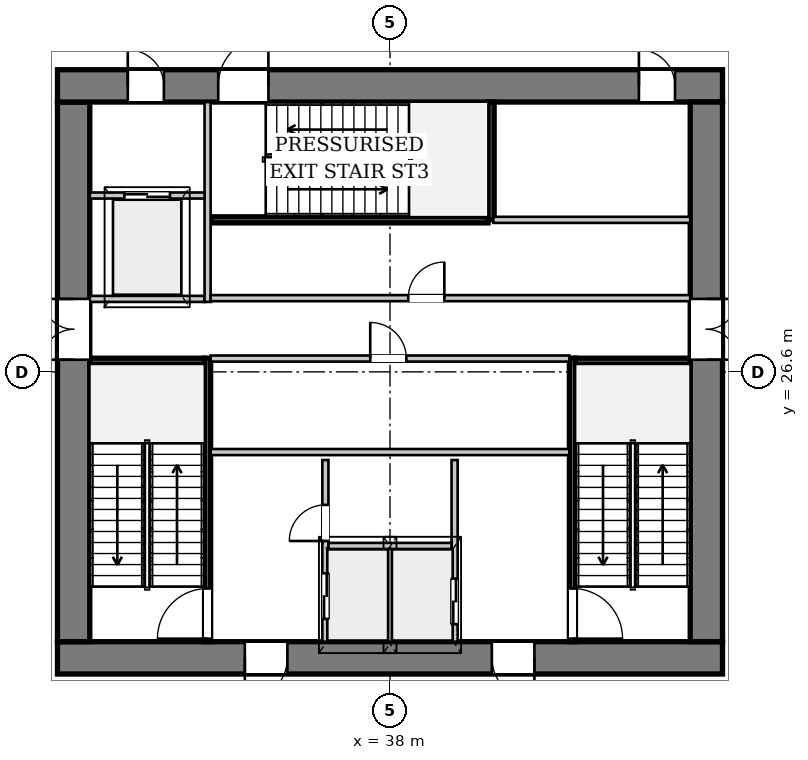
"""IFC4 building model, lengths in metres.
Left out: names, types, materials, properties, quantities, classifications, styles, units other than length and angle.
Written with IfcOpenShell. Run it as: python <this file> out.ifc"""

import sys

from ifc_helpers import new_model, si_unit, direction, frame, frame_2d, origin, place, context, subcontext, project, spatial, rectangle, extrude, source, transform, mapped, element, fill, save


model = new_model("IFC4")
c1 = context("Model", 3, precision=1e-05, world=origin(), true_north=direction((0.0, 1.0)))
c2 = subcontext(c1, "Body", "Model", "MODEL_VIEW")
j1 = project(units=[si_unit("LENGTHUNIT", "METRE"), si_unit("PLANEANGLEUNIT", "RADIAN")], contexts=[c1])
p1 = place(None, origin())
s1 = spatial("IfcSite", under=j1, at=p1, CompositionType="ELEMENT")
p2 = place(p1, origin())
s2 = spatial("IfcBuilding", under=s1, at=p2, CompositionType="ELEMENT")
p3 = place(p2, frame((0.0, 0.0, -9.6)))
s3 = spatial("IfcBuildingStorey", under=s2, at=p3, CompositionType="ELEMENT", Elevation=-9.6)
p4 = place(p3, frame((46.75, 19.075, 0.0), z_axis=(0.0, 0.0, 1.0), x_axis=(-1.0, 0.0, 0.0)))
e1 = element("IfcWall", 1, at=p4, inside=s3, PredefinedType="SHEAR", context=c2, shape_type="SweptSolid", body=[
    extrude(rectangle(XDim=17.5, YDim=0.85, at=frame_2d((8.75, 0.0))), origin(), (0.0, 0.0, 1.0), 4.45),
])
p5 = place(p4, frame((4.95, 0.0, 0.0)))
e2 = element("IfcOpeningElement", 2, at=p5, cuts=e1, PredefinedType="OPENING", context=c2, shape_type="SweptSolid", body=[
    extrude(rectangle(XDim=1.12, YDim=2.25, at=frame_2d((0.56, 1.125))), frame((0.0, 0.435, 0.0), z_axis=(0.0, -1.0, 0.0), x_axis=(1.0, 0.0, 0.0)), (0.0, 0.0, 1.0), 0.87),
])
p6 = place(p4, frame((11.45, 0.0, 0.0)))
e3 = element("IfcOpeningElement", 3, at=p6, cuts=e1, PredefinedType="OPENING", context=c2, shape_type="SweptSolid", body=[
    extrude(rectangle(XDim=1.12, YDim=2.25, at=frame_2d((0.56, 1.125))), frame((0.0, 0.435, 0.0), z_axis=(0.0, -1.0, 0.0), x_axis=(1.0, 0.0, 0.0)), (0.0, 0.0, 1.0), 0.87),
])
p7 = place(p3, frame((29.675, 19.5, 0.0), z_axis=(0.0, 0.0, 1.0), x_axis=(0.0, 1.0, 0.0)))
e4 = element("IfcWall", 4, at=p7, inside=s3, PredefinedType="SHEAR", context=c2, shape_type="SweptSolid", body=[
    extrude(rectangle(XDim=14.2, YDim=0.85, at=frame_2d((7.1, 0.0))), origin(), (0.0, 0.0, 1.0), 4.45),
])
p8 = place(p7, frame((7.42, 0.0, 0.0)))
e5 = element("IfcOpeningElement", 5, at=p8, cuts=e4, PredefinedType="OPENING", context=c2, shape_type="SweptSolid", body=[
    extrude(rectangle(XDim=1.6, YDim=2.2, at=frame_2d((0.8, 1.1))), frame((0.0, 0.435, 0.0), z_axis=(0.0, -1.0, 0.0), x_axis=(1.0, 0.0, 0.0)), (0.0, 0.0, 1.0), 0.87),
])
p9 = place(p3, frame((29.25, 34.125, 0.0), z_axis=(0.0, 0.0, 1.0), x_axis=(1.0, 0.0, 0.0)))
e6 = element("IfcWall", 6, at=p9, inside=s3, PredefinedType="SHEAR", context=c2, shape_type="SweptSolid", body=[
    extrude(rectangle(XDim=17.5, YDim=0.85, at=frame_2d((8.75, 0.0))), origin(), (0.0, 0.0, 1.0), 4.45),
])
p10 = place(p9, frame((1.85, 0.0, 0.0)))
e7 = element("IfcOpeningElement", 7, at=p10, cuts=e6, PredefinedType="OPENING", context=c2, shape_type="SweptSolid", body=[
    extrude(rectangle(XDim=0.95, YDim=2.1, at=frame_2d((0.475, 1.05))), frame((0.0, 0.435, 0.0), z_axis=(0.0, -1.0, 0.0), x_axis=(1.0, 0.0, 0.0)), (0.0, 0.0, 1.0), 0.87),
])
p11 = place(p9, frame((4.23, 0.0, 0.0)))
e8 = element("IfcOpeningElement", 8, at=p11, cuts=e6, PredefinedType="OPENING", context=c2, shape_type="SweptSolid", body=[
    extrude(rectangle(XDim=1.32, YDim=2.2, at=frame_2d((0.66, 1.1))), frame((0.0, 0.435, 0.0), z_axis=(0.0, -1.0, 0.0), x_axis=(1.0, 0.0, 0.0)), (0.0, 0.0, 1.0), 0.87),
])
p12 = place(p9, frame((15.3, 0.0, 0.0)))
e9 = element("IfcOpeningElement", 9, at=p12, cuts=e6, PredefinedType="OPENING", context=c2, shape_type="SweptSolid", body=[
    extrude(rectangle(XDim=0.95, YDim=2.1, at=frame_2d((0.475, 1.05))), frame((0.0, 0.435, 0.0), z_axis=(0.0, -1.0, 0.0), x_axis=(1.0, 0.0, 0.0)), (0.0, 0.0, 1.0), 0.87),
])
p13 = place(p3, frame((46.325, 33.7, 0.0), z_axis=(0.0, 0.0, 1.0), x_axis=(0.0, -1.0, 0.0)))
e10 = element("IfcWall", 10, at=p13, inside=s3, PredefinedType="SHEAR", context=c2, shape_type="SweptSolid", body=[
    extrude(rectangle(XDim=14.2, YDim=0.85, at=frame_2d((7.1, 0.0))), origin(), (0.0, 0.0, 1.0), 4.45),
])
p14 = place(p13, frame((5.18, 0.0, 0.0)))
e11 = element("IfcOpeningElement", 11, at=p14, cuts=e10, PredefinedType="OPENING", context=c2, shape_type="SweptSolid", body=[
    extrude(rectangle(XDim=1.6, YDim=2.2, at=frame_2d((0.8, 1.1))), frame((0.0, 0.435, 0.0), z_axis=(0.0, -1.0, 0.0), x_axis=(1.0, 0.0, 0.0)), (0.0, 0.0, 1.0), 0.87),
])
p15 = place(p3, frame((33.2, 19.5, 0.0), z_axis=(0.0, 0.0, 1.0), x_axis=(0.0, 1.0, 0.0)))
e12 = element("IfcWall", 12, at=p15, inside=s3, PredefinedType="PARTITIONING", context=c2, shape_type="SweptSolid", body=[
    extrude(rectangle(XDim=7.46, YDim=0.16, at=frame_2d((3.73, 0.0))), origin(), (0.0, 0.0, 1.0), 4.45),
])
p16 = place(p15, frame((0.08, 0.0, 0.0)))
e13 = element("IfcOpeningElement", 13, at=p16, cuts=e12, PredefinedType="OPENING", context=c2, shape_type="SweptSolid", body=[
    extrude(rectangle(XDim=1.32, YDim=2.2, at=frame_2d((0.66, 1.1))), frame((0.0, 0.09, 0.0), z_axis=(0.0, -1.0, 0.0), x_axis=(1.0, 0.0, 0.0)), (0.0, 0.0, 1.0), 0.18),
])
p17 = place(p3, frame((30.1, 26.88, 0.0), z_axis=(0.0, 0.0, 1.0), x_axis=(1.0, 0.0, 0.0)))
e14 = element("IfcWall", 14, at=p17, inside=s3, PredefinedType="PARTITIONING", context=c2, shape_type="SweptSolid", body=[
    extrude(rectangle(XDim=3.02, YDim=0.16, at=frame_2d((1.51, 0.0))), origin(), (0.0, 0.0, 1.0), 4.45),
])
p18 = place(p3, frame((42.8, 26.96, 0.0), z_axis=(0.0, 0.0, 1.0), x_axis=(0.0, -1.0, 0.0)))
e15 = element("IfcWall", 15, at=p18, inside=s3, PredefinedType="PARTITIONING", context=c2, shape_type="SweptSolid", body=[
    extrude(rectangle(XDim=7.46, YDim=0.16, at=frame_2d((3.73, 0.0))), origin(), (0.0, 0.0, 1.0), 4.45),
])
p19 = place(p18, frame((6.06, 0.0, 0.0)))
e16 = element("IfcOpeningElement", 16, at=p19, cuts=e15, PredefinedType="OPENING", context=c2, shape_type="SweptSolid", body=[
    extrude(rectangle(XDim=1.32, YDim=2.2, at=frame_2d((0.66, 1.1))), frame((0.0, 0.09, 0.0), z_axis=(0.0, -1.0, 0.0), x_axis=(1.0, 0.0, 0.0)), (0.0, 0.0, 1.0), 0.18),
])
p20 = place(p3, frame((42.88, 26.88, 0.0), z_axis=(0.0, 0.0, 1.0), x_axis=(1.0, 0.0, 0.0)))
e17 = element("IfcWall", 17, at=p20, inside=s3, PredefinedType="PARTITIONING", context=c2, shape_type="SweptSolid", body=[
    extrude(rectangle(XDim=3.02, YDim=0.16, at=frame_2d((1.51, 0.0))), origin(), (0.0, 0.0, 1.0), 4.45),
])
p21 = place(p3, frame((33.28, 30.6, 0.0), z_axis=(0.0, 0.0, 1.0), x_axis=(1.0, 0.0, 0.0)))
e18 = element("IfcWall", 18, at=p21, inside=s3, PredefinedType="PARTITIONING", context=c2, shape_type="SweptSolid", body=[
    extrude(rectangle(XDim=7.3, YDim=0.16, at=frame_2d((3.65, 0.0))), origin(), (0.0, 0.0, 1.0), 4.45),
])
p22 = place(p3, frame((40.66, 30.6, 0.0), z_axis=(0.0, 0.0, 1.0), x_axis=(0.0, 1.0, 0.0)))
e19 = element("IfcWall", 19, at=p22, inside=s3, PredefinedType="PARTITIONING", context=c2, shape_type="SweptSolid", body=[
    extrude(rectangle(XDim=3.1, YDim=0.16, at=frame_2d((1.55, 0.0))), origin(), (0.0, 0.0, 1.0), 4.45),
])
p23 = place(p3, frame((36.3, 19.5, 0.0), z_axis=(0.0, 0.0, 1.0), x_axis=(0.0, 1.0, 0.0)))
e20 = element("IfcWall", 20, at=p23, inside=s3, PredefinedType="PARTITIONING", context=c2, shape_type="SweptSolid", body=[
    extrude(rectangle(XDim=4.78, YDim=0.16, at=frame_2d((2.39, 0.0))), origin(), (0.0, 0.0, 1.0), 4.45),
])
p24 = place(p23, frame((0.6, 0.0, 0.0)))
e21 = element("IfcOpeningElement", 21, at=p24, cuts=e20, PredefinedType="OPENING", context=c2, shape_type="SweptSolid", body=[
    extrude(rectangle(XDim=1.2, YDim=2.2, at=frame_2d((0.6, 1.1))), frame((0.0, 0.09, 0.0), z_axis=(0.0, -1.0, 0.0), x_axis=(1.0, 0.0, 0.0)), (0.0, 0.0, 1.0), 0.18),
])
p25 = place(p23, frame((2.65, 0.0, 0.0)))
e22 = element("IfcOpeningElement", 22, at=p25, cuts=e20, PredefinedType="OPENING", context=c2, shape_type="SweptSolid", body=[
    extrude(rectangle(XDim=0.95, YDim=2.1, at=frame_2d((0.475, 1.05))), frame((0.0, 0.09, 0.0), z_axis=(0.0, -1.0, 0.0), x_axis=(1.0, 0.0, 0.0)), (0.0, 0.0, 1.0), 0.18),
])
p26 = place(p3, frame((39.7, 24.28, 0.0), z_axis=(0.0, 0.0, 1.0), x_axis=(0.0, -1.0, 0.0)))
e23 = element("IfcWall", 23, at=p26, inside=s3, PredefinedType="PARTITIONING", context=c2, shape_type="SweptSolid", body=[
    extrude(rectangle(XDim=4.78, YDim=0.16, at=frame_2d((2.39, 0.0))), origin(), (0.0, 0.0, 1.0), 4.45),
])
p27 = place(p26, frame((3.12, 0.0, 0.0)))
e24 = element("IfcOpeningElement", 24, at=p27, cuts=e23, PredefinedType="OPENING", context=c2, shape_type="SweptSolid", body=[
    extrude(rectangle(XDim=1.2, YDim=2.2, at=frame_2d((0.6, 1.1))), frame((0.0, 0.09, 0.0), z_axis=(0.0, -1.0, 0.0), x_axis=(1.0, 0.0, 0.0)), (0.0, 0.0, 1.0), 0.18),
])
p28 = place(p3, frame((38.0, 19.5, 0.0), z_axis=(0.0, 0.0, 1.0), x_axis=(0.0, 1.0, 0.0)))
e25 = element("IfcWall", 25, at=p28, inside=s3, PredefinedType="PARTITIONING", context=c2, shape_type="SweptSolid", body=[
    extrude(rectangle(XDim=2.46, YDim=0.125, at=frame_2d((1.23, 0.0))), origin(), (0.0, 0.0, 1.0), 4.45),
])
p29 = place(p3, frame((36.38, 22.02, 0.0), z_axis=(0.0, 0.0, 1.0), x_axis=(1.0, 0.0, 0.0)))
e26 = element("IfcWall", 26, at=p29, inside=s3, PredefinedType="PARTITIONING", context=c2, shape_type="SweptSolid", body=[
    extrude(rectangle(XDim=3.24, YDim=0.16, at=frame_2d((1.62, 0.0))), origin(), (0.0, 0.0, 1.0), 4.45),
])
p30 = place(p3, frame((33.28, 24.49, 0.0), z_axis=(0.0, 0.0, 1.0), x_axis=(1.0, 0.0, 0.0)))
e27 = element("IfcWall", 27, at=p30, inside=s3, PredefinedType="PARTITIONING", context=c2, shape_type="SweptSolid", body=[
    extrude(rectangle(XDim=9.44, YDim=0.16, at=frame_2d((4.72, 0.0))), origin(), (0.0, 0.0, 1.0), 4.45),
])
p31 = place(p3, frame((30.1, 28.52, 0.0), z_axis=(0.0, 0.0, 1.0), x_axis=(1.0, 0.0, 0.0)))
e28 = element("IfcWall", 28, at=p31, inside=s3, PredefinedType="PARTITIONING", context=c2, shape_type="SweptSolid", body=[
    extrude(rectangle(XDim=3.02, YDim=0.16, at=frame_2d((1.51, 0.0))), origin(), (0.0, 0.0, 1.0), 4.45),
])
p32 = place(p3, frame((33.2, 28.44, 0.0), z_axis=(0.0, 0.0, 1.0), x_axis=(0.0, 1.0, 0.0)))
e29 = element("IfcWall", 29, at=p32, inside=s3, PredefinedType="PARTITIONING", context=c2, shape_type="SweptSolid", body=[
    extrude(rectangle(XDim=5.26, YDim=0.16, at=frame_2d((2.63, 0.0))), origin(), (0.0, 0.0, 1.0), 4.45),
])
p33 = place(p3, frame((30.1, 31.24, 0.0), z_axis=(0.0, 0.0, 1.0), x_axis=(1.0, 0.0, 0.0)))
e30 = element("IfcWall", 30, at=p33, inside=s3, PredefinedType="PARTITIONING", context=c2, shape_type="SweptSolid", body=[
    extrude(rectangle(XDim=3.02, YDim=0.16, at=frame_2d((1.51, 0.0))), origin(), (0.0, 0.0, 1.0), 4.45),
])
p34 = place(p33, frame((0.91, 0.0, 0.0)))
e31 = element("IfcOpeningElement", 31, at=p34, cuts=e30, PredefinedType="OPENING", context=c2, shape_type="SweptSolid", body=[
    extrude(rectangle(XDim=1.2, YDim=2.2, at=frame_2d((0.6, 1.1))), frame((0.0, 0.09, 0.0), z_axis=(0.0, -1.0, 0.0), x_axis=(1.0, 0.0, 0.0)), (0.0, 0.0, 1.0), 0.18),
])
p35 = place(p3, frame((33.28, 26.95, 0.0), z_axis=(0.0, 0.0, 1.0), x_axis=(1.0, 0.0, 0.0)))
e32 = element("IfcWall", 32, at=p35, inside=s3, PredefinedType="PARTITIONING", context=c2, shape_type="SweptSolid", body=[
    extrude(rectangle(XDim=9.44, YDim=0.16, at=frame_2d((4.72, 0.0))), origin(), (0.0, 0.0, 1.0), 4.45),
])
p36 = place(p35, frame((4.2, 0.0, 0.0)))
e33 = element("IfcOpeningElement", 33, at=p36, cuts=e32, PredefinedType="OPENING", context=c2, shape_type="SweptSolid", body=[
    extrude(rectangle(XDim=0.95, YDim=2.1, at=frame_2d((0.475, 1.05))), frame((0.0, 0.09, 0.0), z_axis=(0.0, -1.0, 0.0), x_axis=(1.0, 0.0, 0.0)), (0.0, 0.0, 1.0), 0.18),
])
p37 = place(p3, frame((33.28, 28.54, 0.0), z_axis=(0.0, 0.0, 1.0), x_axis=(1.0, 0.0, 0.0)))
e34 = element("IfcWall", 34, at=p37, inside=s3, PredefinedType="PARTITIONING", context=c2, shape_type="SweptSolid", body=[
    extrude(rectangle(XDim=12.62, YDim=0.16, at=frame_2d((6.31, 0.0))), origin(), (0.0, 0.0, 1.0), 4.45),
])
p38 = place(p37, frame((5.2, 0.0, 0.0)))
e35 = element("IfcOpeningElement", 35, at=p38, cuts=e34, PredefinedType="OPENING", context=c2, shape_type="SweptSolid", body=[
    extrude(rectangle(XDim=0.95, YDim=2.1, at=frame_2d((0.475, 1.05))), frame((0.0, 0.09, 0.0), z_axis=(0.0, -1.0, 0.0), x_axis=(1.0, 0.0, 0.0)), (0.0, 0.0, 1.0), 0.18),
])
p39 = place(p3, frame((40.72, 30.6, 0.0), z_axis=(0.0, 0.0, 1.0), x_axis=(1.0, 0.0, 0.0)))
e36 = element("IfcWall", 36, at=p39, inside=s3, PredefinedType="PARTITIONING", context=c2, shape_type="SweptSolid", body=[
    extrude(rectangle(XDim=5.18, YDim=0.16, at=frame_2d((2.59, 0.0))), origin(), (0.0, 0.0, 1.0), 4.45),
])
m1 = source(origin(), c2, "Body", "SweptSolid", [
    extrude(rectangle(XDim=1.12, YDim=2.25, at=frame_2d((0.56, 1.125))), frame((0.0, 0.025, 0.0), z_axis=(0.0, -1.0, 0.0), x_axis=(1.0, 0.0, 0.0)), (0.0, 0.0, 1.0), 0.05),
])
p40 = place(p5, origin())
e37 = element("IfcDoor", 37, at=p40, inside=s3, OperationType="SINGLE_SWING_LEFT", PredefinedType="DOOR", context=c2, shape_type="MappedRepresentation", body=[
    mapped(m1, transform((0.0, 0.0, 0.0), x_axis=(1.0, 0.0, 0.0), y_axis=(0.0, 1.0, 0.0), z_axis=(0.0, 0.0, 1.0), scale=1.0)),
])
fill(e2, e37)
p41 = place(p6, origin())
e38 = element("IfcDoor", 38, at=p41, inside=s3, OperationType="SINGLE_SWING_RIGHT", PredefinedType="DOOR", context=c2, shape_type="MappedRepresentation", body=[
    mapped(m1, transform((0.0, 0.0, 0.0), x_axis=(1.0, 0.0, 0.0), y_axis=(0.0, 1.0, 0.0), z_axis=(0.0, 0.0, 1.0), scale=1.0)),
])
fill(e3, e38)
m2 = source(origin(), c2, "Body", "SweptSolid", [
    extrude(rectangle(XDim=1.6, YDim=2.2, at=frame_2d((0.8, 1.1))), frame((0.0, 0.025, 0.0), z_axis=(0.0, -1.0, 0.0), x_axis=(1.0, 0.0, 0.0)), (0.0, 0.0, 1.0), 0.05),
])
p42 = place(p8, origin())
e39 = element("IfcDoor", 39, at=p42, inside=s3, OperationType="DOUBLE_DOOR_SINGLE_SWING", PredefinedType="DOOR", context=c2, shape_type="MappedRepresentation", body=[
    mapped(m2, transform((0.0, 0.0, 0.0), x_axis=(1.0, 0.0, 0.0), y_axis=(0.0, 1.0, 0.0), z_axis=(0.0, 0.0, 1.0), scale=1.0)),
])
fill(e5, e39)
m3 = source(origin(), c2, "Body", "SweptSolid", [
    extrude(rectangle(XDim=0.95, YDim=2.1, at=frame_2d((0.475, 1.05))), frame((0.0, 0.025, 0.0), z_axis=(0.0, -1.0, 0.0), x_axis=(1.0, 0.0, 0.0)), (0.0, 0.0, 1.0), 0.05),
])
p43 = place(p10, origin())
e40 = element("IfcDoor", 40, at=p43, inside=s3, OperationType="SINGLE_SWING_LEFT", PredefinedType="DOOR", context=c2, shape_type="MappedRepresentation", body=[
    mapped(m3, transform((0.0, 0.0, 0.0), x_axis=(1.0, 0.0, 0.0), y_axis=(0.0, 1.0, 0.0), z_axis=(0.0, 0.0, 1.0), scale=1.0)),
])
fill(e7, e40)
m4 = source(origin(), c2, "Body", "SweptSolid", [
    extrude(rectangle(XDim=1.32, YDim=2.2, at=frame_2d((0.66, 1.1))), frame((0.0, 0.025, 0.0), z_axis=(0.0, -1.0, 0.0), x_axis=(1.0, 0.0, 0.0)), (0.0, 0.0, 1.0), 0.05),
])
p44 = place(p11, origin())
e41 = element("IfcDoor", 41, at=p44, inside=s3, OperationType="SINGLE_SWING_RIGHT", PredefinedType="DOOR", context=c2, shape_type="MappedRepresentation", body=[
    mapped(m4, transform((0.0, 0.0, 0.0), x_axis=(1.0, 0.0, 0.0), y_axis=(0.0, 1.0, 0.0), z_axis=(0.0, 0.0, 1.0), scale=1.0)),
])
fill(e8, e41)
p45 = place(p14, origin())
e42 = element("IfcDoor", 42, at=p45, inside=s3, OperationType="DOUBLE_DOOR_SINGLE_SWING", PredefinedType="DOOR", context=c2, shape_type="MappedRepresentation", body=[
    mapped(m2, transform((0.0, 0.0, 0.0), x_axis=(1.0, 0.0, 0.0), y_axis=(0.0, 1.0, 0.0), z_axis=(0.0, 0.0, 1.0), scale=1.0)),
])
fill(e11, e42)
p46 = place(p16, origin())
e43 = element("IfcDoor", 43, at=p46, inside=s3, OperationType="SINGLE_SWING_LEFT", PredefinedType="DOOR", context=c2, shape_type="MappedRepresentation", body=[
    mapped(m4, transform((0.0, 0.0, 0.0), x_axis=(1.0, 0.0, 0.0), y_axis=(0.0, 1.0, 0.0), z_axis=(0.0, 0.0, 1.0), scale=1.0)),
])
fill(e13, e43)
p47 = place(p19, origin())
e44 = element("IfcDoor", 44, at=p47, inside=s3, OperationType="SINGLE_SWING_RIGHT", PredefinedType="DOOR", context=c2, shape_type="MappedRepresentation", body=[
    mapped(m4, transform((0.0, 0.0, 0.0), x_axis=(1.0, 0.0, 0.0), y_axis=(0.0, 1.0, 0.0), z_axis=(0.0, 0.0, 1.0), scale=1.0)),
])
fill(e16, e44)
m5 = source(origin(), c2, "Body", "SweptSolid", [
    extrude(rectangle(XDim=1.2, YDim=2.2, at=frame_2d((0.6, 1.1))), frame((0.0, 0.025, 0.0), z_axis=(0.0, -1.0, 0.0), x_axis=(1.0, 0.0, 0.0)), (0.0, 0.0, 1.0), 0.05),
])
p48 = place(p24, origin())
e45 = element("IfcDoor", 45, at=p48, inside=s3, OperationType="DOUBLE_DOOR_SLIDING", PredefinedType="DOOR", context=c2, shape_type="MappedRepresentation", body=[
    mapped(m5, transform((0.0, 0.0, 0.0), x_axis=(1.0, 0.0, 0.0), y_axis=(0.0, 1.0, 0.0), z_axis=(0.0, 0.0, 1.0), scale=1.0)),
])
fill(e21, e45)
p49 = place(p25, origin())
e46 = element("IfcDoor", 46, at=p49, inside=s3, OperationType="SINGLE_SWING_LEFT", PredefinedType="DOOR", context=c2, shape_type="MappedRepresentation", body=[
    mapped(m3, transform((0.0, 0.0, 0.0), x_axis=(1.0, 0.0, 0.0), y_axis=(0.0, 1.0, 0.0), z_axis=(0.0, 0.0, 1.0), scale=1.0)),
])
fill(e22, e46)
p50 = place(p27, origin())
e47 = element("IfcDoor", 47, at=p50, inside=s3, OperationType="DOUBLE_DOOR_SLIDING", PredefinedType="DOOR", context=c2, shape_type="MappedRepresentation", body=[
    mapped(m5, transform((0.0, 0.0, 0.0), x_axis=(1.0, 0.0, 0.0), y_axis=(0.0, 1.0, 0.0), z_axis=(0.0, 0.0, 1.0), scale=1.0)),
])
fill(e24, e47)
p51 = place(p34, origin())
e48 = element("IfcDoor", 48, at=p51, inside=s3, OperationType="DOUBLE_DOOR_SLIDING", PredefinedType="DOOR", context=c2, shape_type="MappedRepresentation", body=[
    mapped(m5, transform((0.0, 0.0, 0.0), x_axis=(1.0, 0.0, 0.0), y_axis=(0.0, 1.0, 0.0), z_axis=(0.0, 0.0, 1.0), scale=1.0)),
])
fill(e31, e48)
p52 = place(p36, origin())
e49 = element("IfcDoor", 49, at=p52, inside=s3, OperationType="SINGLE_SWING_LEFT", PredefinedType="DOOR", context=c2, shape_type="MappedRepresentation", body=[
    mapped(m3, transform((0.0, 0.0, 0.0), x_axis=(1.0, 0.0, 0.0), y_axis=(0.0, 1.0, 0.0), z_axis=(0.0, 0.0, 1.0), scale=1.0)),
])
fill(e33, e49)
p53 = place(p38, origin())
e50 = element("IfcDoor", 50, at=p53, inside=s3, OperationType="SINGLE_SWING_RIGHT", PredefinedType="DOOR", context=c2, shape_type="MappedRepresentation", body=[
    mapped(m3, transform((0.0, 0.0, 0.0), x_axis=(1.0, 0.0, 0.0), y_axis=(0.0, 1.0, 0.0), z_axis=(0.0, 0.0, 1.0), scale=1.0)),
])
fill(e35, e50)
p54 = place(p12, origin())
e51 = element("IfcDoor", 51, at=p54, inside=s3, OperationType="SINGLE_SWING_LEFT", PredefinedType="DOOR", context=c2, shape_type="MappedRepresentation", body=[
    mapped(m3, transform((0.0, 0.0, 0.0), x_axis=(1.0, 0.0, 0.0), y_axis=(0.0, 1.0, 0.0), z_axis=(0.0, 0.0, 1.0), scale=1.0)),
])
fill(e9, e51)
save(model, sys.argv[1])
